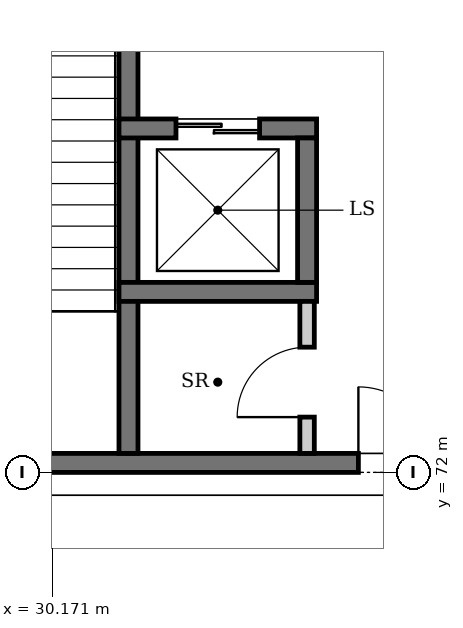
"""IFC4 building model, lengths in metres.
Left out: names, types, materials, properties, quantities, classifications, styles, units other than length and angle.
Written with IfcOpenShell. Run it as: python <this file> out.ifc"""

import sys

from ifc_helpers import new_model, si_unit, direction, frame, frame_2d, origin, place, context, subcontext, project, spatial, rectangle, extrude, element, fill, save


model = new_model("IFC4")
c1 = context("Model", 3, precision=1e-05, world=origin(), true_north=direction((0.0, 1.0)))
c2 = subcontext(c1, "Body", "Model", "MODEL_VIEW")
j1 = project(units=[si_unit("LENGTHUNIT", "METRE"), si_unit("PLANEANGLEUNIT", "RADIAN")], contexts=[c1])
p1 = place(None, origin())
s1 = spatial("IfcSite", under=j1, at=p1, CompositionType="ELEMENT")
p2 = place(p1, origin())
s2 = spatial("IfcBuilding", under=s1, at=p2, CompositionType="ELEMENT")
p3 = place(p2, origin())
s3 = spatial("IfcBuildingStorey", under=s2, at=p3, CompositionType="ELEMENT", Elevation=0.0)
p4 = place(p3, frame((27.25, 72.125, 0.0), z_axis=(0.0, 0.0, 1.0), x_axis=(1.0, 0.0, 0.0)))
e1 = element("IfcWall", 1, at=p4, inside=s3, PredefinedType="SHEAR", context=c2, shape_type="SweptSolid", body=[
    extrude(rectangle(XDim=8.5, YDim=0.25, at=frame_2d((4.25, 0.0))), origin(), (0.0, 0.0, 1.0), 6.0),
])
p5 = place(p4, frame((6.95, 0.0, 0.0)))
e2 = element("IfcOpeningElement", 2, at=p5, cuts=e1, PredefinedType="OPENING", context=c2, shape_type="SweptSolid", body=[
    extrude(rectangle(XDim=1.0, YDim=2.1, at=frame_2d((0.5, 1.05))), frame((0.0, 0.135, 0.0), z_axis=(0.0, -1.0, 0.0), x_axis=(1.0, 0.0, 0.0)), (0.0, 0.0, 1.0), 0.27),
])
p6 = place(p3, frame((31.175, 80.4, 0.0), z_axis=(0.0, 0.0, 1.0), x_axis=(0.0, -1.0, 0.0)))
e3 = element("IfcWall", 3, at=p6, inside=s3, PredefinedType="SOLIDWALL", context=c2, shape_type="SweptSolid", body=[
    extrude(rectangle(XDim=8.15, YDim=0.25, at=frame_2d((4.075, 0.0))), origin(), (0.0, 0.0, 1.0), 5.75),
])
p7 = place(p6, frame((0.4, 0.0, 0.0)))
e4 = element("IfcOpeningElement", 4, at=p7, cuts=e3, PredefinedType="OPENING", context=c2, shape_type="SweptSolid", body=[
    extrude(rectangle(XDim=1.0, YDim=2.1, at=frame_2d((0.5, 1.05))), frame((0.0, 0.135, 0.0), z_axis=(0.0, -1.0, 0.0), x_axis=(1.0, 0.0, 0.0)), (0.0, 0.0, 1.0), 0.27),
])
p8 = place(p3, frame((31.05, 74.375, -1.4), z_axis=(0.0, 0.0, 1.0), x_axis=(1.0, 0.0, 0.0)))
e5 = element("IfcWall", 5, at=p8, inside=s3, PredefinedType="SOLIDWALL", context=c2, shape_type="SweptSolid", body=[
    extrude(rectangle(XDim=2.6, YDim=0.25, at=frame_2d((1.3, 0.0))), origin(), (0.0, 0.0, 1.0), 7.4),
])
p9 = place(p3, frame((31.05, 76.525, -1.4), z_axis=(0.0, 0.0, 1.0), x_axis=(1.0, 0.0, 0.0)))
e6 = element("IfcWall", 6, at=p9, inside=s3, PredefinedType="SOLIDWALL", context=c2, shape_type="SweptSolid", body=[
    extrude(rectangle(XDim=2.6, YDim=0.25, at=frame_2d((1.3, 0.0))), origin(), (0.0, 0.0, 1.0), 7.4),
])
p10 = place(p9, frame((0.75, 0.0, 1.4)))
e7 = element("IfcOpeningElement", 7, at=p10, cuts=e6, PredefinedType="OPENING", context=c2, shape_type="SweptSolid", body=[
    extrude(rectangle(XDim=1.1, YDim=2.1, at=frame_2d((0.55, 1.05))), frame((0.0, 0.135, 0.0), z_axis=(0.0, -1.0, 0.0), x_axis=(1.0, 0.0, 0.0)), (0.0, 0.0, 1.0), 0.27),
])
p11 = place(p3, frame((33.525, 74.5, -1.4), z_axis=(0.0, 0.0, 1.0), x_axis=(0.0, 1.0, 0.0)))
e8 = element("IfcWall", 8, at=p11, inside=s3, PredefinedType="SOLIDWALL", context=c2, shape_type="SweptSolid", body=[
    extrude(rectangle(XDim=1.9, YDim=0.25, at=frame_2d((0.95, 0.0))), origin(), (0.0, 0.0, 1.0), 7.4),
])
p12 = place(p3, frame((33.525, 72.25, 0.0), z_axis=(0.0, 0.0, 1.0), x_axis=(0.0, 1.0, 0.0)))
e9 = element("IfcWall", 9, at=p12, inside=s3, PredefinedType="PARTITIONING", context=c2, shape_type="SweptSolid", body=[
    extrude(rectangle(XDim=2.0, YDim=0.19, at=frame_2d((1.0, 0.0))), origin(), (0.0, 0.0, 1.0), 5.75),
])
p13 = place(p12, frame((0.478, 0.0, 0.0)))
e10 = element("IfcOpeningElement", 10, at=p13, cuts=e9, PredefinedType="OPENING", context=c2, shape_type="SweptSolid", body=[
    extrude(rectangle(XDim=0.92, YDim=2.1, at=frame_2d((0.46, 1.05))), frame((0.0, 0.105, 0.0), z_axis=(0.0, -1.0, 0.0), x_axis=(1.0, 0.0, 0.0)), (0.0, 0.0, 1.0), 0.21),
])
p14 = place(p10, origin())
e11 = element("IfcDoor", 11, at=p14, inside=s3, OperationType="DOUBLE_DOOR_SLIDING", PredefinedType="DOOR", context=c2, shape_type="SweptSolid", body=[
    extrude(rectangle(XDim=1.1, YDim=2.1, at=frame_2d((0.55, 1.05))), frame((0.0, 0.025, 0.0), z_axis=(0.0, -1.0, 0.0), x_axis=(1.0, 0.0, 0.0)), (0.0, 0.0, 1.0), 0.05),
])
fill(e7, e11)
p15 = place(p5, origin())
e12 = element("IfcDoor", 12, at=p15, inside=s3, OperationType="SINGLE_SWING_LEFT", PredefinedType="DOOR", context=c2, shape_type="SweptSolid", body=[
    extrude(rectangle(XDim=1.0, YDim=2.1, at=frame_2d((0.5, 1.05))), frame((0.0, 0.025, 0.0), z_axis=(0.0, -1.0, 0.0), x_axis=(1.0, 0.0, 0.0)), (0.0, 0.0, 1.0), 0.05),
])
fill(e2, e12)
p16 = place(p13, origin())
e13 = element("IfcDoor", 13, at=p16, inside=s3, OperationType="SINGLE_SWING_LEFT", PredefinedType="DOOR", context=c2, shape_type="SweptSolid", body=[
    extrude(rectangle(XDim=0.92, YDim=2.1, at=frame_2d((0.46, 1.05))), frame((0.0, 0.025, 0.0), z_axis=(0.0, -1.0, 0.0), x_axis=(1.0, 0.0, 0.0)), (0.0, 0.0, 1.0), 0.05),
])
fill(e10, e13)
save(model, sys.argv[1])
